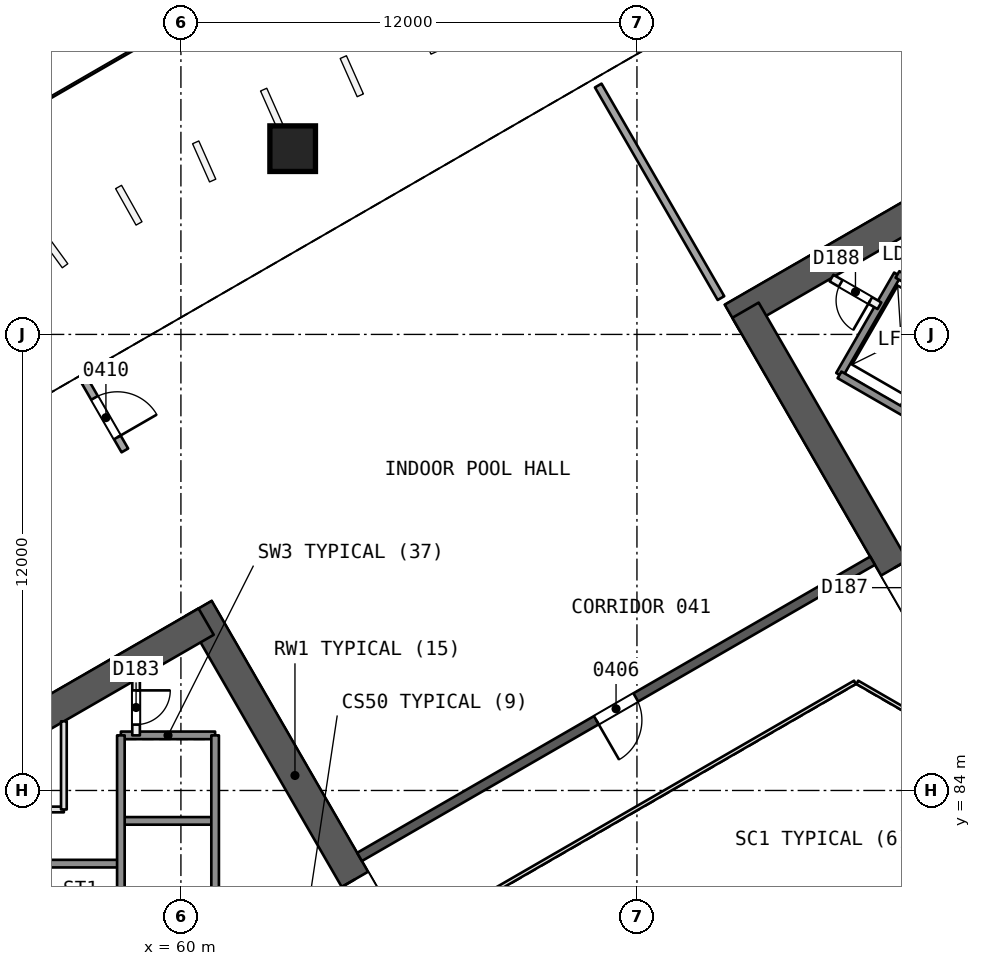
"""IFC4 building model, lengths in metres.
Left out: names, types, materials, properties, quantities, classifications, styles, units other than length and angle.
Written with IfcOpenShell. Run it as: python <this file> out.ifc"""

import sys

from ifc_helpers import new_model, si_unit, direction, frame, frame_2d, origin, origin_2d, place, context, subcontext, project, spatial, rectangle, extrude, element, fill, save


model = new_model("IFC4")
c1 = context("Model", 3, precision=1e-05, world=origin(), true_north=direction((0.0, 1.0)))
c2 = subcontext(c1, "Body", "Model", "MODEL_VIEW")
j1 = project(units=[si_unit("LENGTHUNIT", "METRE"), si_unit("PLANEANGLEUNIT", "RADIAN")], contexts=[c1])
p1 = place(None, origin())
s1 = spatial("IfcSite", under=j1, at=p1, CompositionType="ELEMENT")
p2 = place(p1, origin())
s2 = spatial("IfcBuilding", under=s1, at=p2, CompositionType="ELEMENT")
p3 = place(p2, frame((0.0, 0.0, 25.4)))
s3 = spatial("IfcBuildingStorey", under=s2, at=p3, CompositionType="ELEMENT", Elevation=25.4)
p4 = place(p3, frame((65.538, 80.0, 0.0), z_axis=(0.0, 0.0, 1.0), x_axis=(-0.49999662545, 0.866027352073, 0.0)))
e1 = element("IfcWall", 1, at=p4, inside=s3, PredefinedType="SHEAR", context=c2, shape_type="SweptSolid", body=[
    extrude(rectangle(XDim=10.149, YDim=0.8, at=frame_2d((5.074, 0.0))), origin(), (0.0, 0.0, 1.0), 4.6),
])
p5 = place(p4, frame((0.719, 0.0, 0.0)))
e2 = element("IfcOpeningElement", 2, at=p5, cuts=e1, PredefinedType="OPENING", context=c2, shape_type="SweptSolid", body=[
    extrude(rectangle(XDim=1.2, YDim=2.1, at=frame_2d((0.6, 1.05))), frame((0.0, 0.411, 0.0), z_axis=(0.0, -1.0, 0.0), x_axis=(1.0, 0.0, 0.0)), (0.0, 0.0, 1.0), 0.821),
])
p6 = place(p3, frame((60.664, 88.443, 0.0), z_axis=(0.0, 0.0, 1.0), x_axis=(-0.866029478545, -0.499992942241, 0.0)))
e3 = element("IfcWall", 3, at=p6, inside=s3, PredefinedType="SHEAR", context=c2, shape_type="SweptSolid", body=[
    extrude(rectangle(XDim=13.933, YDim=0.8, at=frame_2d((6.967, 0.0))), origin(), (0.0, 0.0, 1.0), 4.6),
])
p7 = place(p3, frame((86.723, 103.488, 0.0), z_axis=(0.0, 0.0, 1.0), x_axis=(-0.866032504327, -0.499987701298, 0.0)))
e4 = element("IfcWall", 4, at=p7, inside=s3, PredefinedType="SHEAR", context=c2, shape_type="SweptSolid", body=[
    extrude(rectangle(XDim=14.102, YDim=0.8, at=frame_2d((7.051, 0.0))), origin(), (0.0, 0.0, 1.0), 4.6),
])
p8 = place(p3, frame((74.856, 96.637, 0.0), z_axis=(0.0, 0.0, 1.0), x_axis=(0.499993500917, -0.866029155999, 0.0)))
e5 = element("IfcWall", 5, at=p8, inside=s3, PredefinedType="SHEAR", context=c2, shape_type="SweptSolid", body=[
    extrude(rectangle(XDim=9.98, YDim=0.8, at=frame_2d((4.99, 0.0))), origin(), (0.0, 0.0, 1.0), 4.6),
])
p9 = place(p8, frame((7.83, 0.0, 0.0)))
e6 = element("IfcOpeningElement", 6, at=p9, cuts=e5, PredefinedType="OPENING", context=c2, shape_type="SweptSolid", body=[
    extrude(rectangle(XDim=1.2, YDim=2.1, at=frame_2d((0.6, 1.05))), frame((0.0, 0.411, 0.0), z_axis=(0.0, -1.0, 0.0), x_axis=(1.0, 0.0, 0.0)), (0.0, 0.0, 1.0), 0.821),
])
p10 = place(p3, frame((78.2, 90.046, 0.0), z_axis=(0.0, 0.0, 1.0), x_axis=(-0.866026492143, -0.499998114903, 0.0)))
e7 = element("IfcWall", 7, at=p10, inside=s3, PredefinedType="SHEAR", context=c2, shape_type="SweptSolid", body=[
    extrude(rectangle(XDim=15.588, YDim=0.25, at=frame_2d((7.794, 0.0))), origin(), (0.0, 0.0, 1.0), 4.1),
])
p11 = place(p10, frame((7.194, 0.0, 0.0)))
e8 = element("IfcOpeningElement", 8, at=p11, cuts=e7, PredefinedType="OPENING", context=c2, shape_type="SweptSolid", body=[
    extrude(rectangle(XDim=1.2, YDim=2.4, at=frame_2d((0.6, 1.2))), frame((0.0, 0.135, 0.0), z_axis=(0.0, -1.0, 0.0), x_axis=(1.0, 0.0, 0.0)), (0.0, 0.0, 1.0), 0.271),
])
p12 = place(p3, frame((62.928, 100.908, 0.0), z_axis=(0.010134853242, -0.017510479423, 0.999795312982), x_axis=(-0.500826723306, 0.865311077638, 0.020231958379)))
e9 = element("IfcColumn", 9, at=p12, inside=s3, PredefinedType="COLUMN", context=c2, shape_type="SweptSolid", body=[
    extrude(rectangle(XDim=1.2, YDim=1.2, at=origin_2d()), origin(), (0.0, 0.0, 1.0), 4.601),
])
p13 = place(p3, frame((57.481, 94.754, 0.0), z_axis=(0.0, 0.0, 1.0), x_axis=(0.500002690545, -0.866023850392, 0.0)))
e10 = element("IfcWall", 10, at=p13, inside=s3, PredefinedType="PARTITIONING", context=c2, shape_type="SweptSolid", body=[
    extrude(rectangle(XDim=2.086, YDim=0.2, at=frame_2d((1.043, 0.0))), origin(), (0.0, 0.0, 1.0), 4.1),
])
p14 = place(p13, frame((0.49, 0.0, 0.0)))
e11 = element("IfcOpeningElement", 11, at=p14, cuts=e10, PredefinedType="OPENING", context=c2, shape_type="SweptSolid", body=[
    extrude(rectangle(XDim=1.2, YDim=2.4, at=frame_2d((0.6, 1.2))), frame((0.0, 0.11, 0.0), z_axis=(0.0, -1.0, 0.0), x_axis=(1.0, 0.0, 0.0)), (0.0, 0.0, 1.0), 0.221),
])
p15 = place(p3, frame((74.21, 96.956, 0.0), z_axis=(0.0, 0.0, 1.0), x_axis=(-0.500001702147, 0.866024421047, 0.0)))
e12 = element("IfcWall", 12, at=p15, inside=s3, PredefinedType="PARTITIONING", context=c2, shape_type="SweptSolid", body=[
    extrude(rectangle(XDim=6.458, YDim=0.2, at=frame_2d((3.229, 0.0))), origin(), (0.0, 0.0, 1.0), 4.1),
])
p16 = place(p3, frame((60.9, 85.45, 0.0), z_axis=(0.0, 0.0, 1.0), x_axis=(-1.0, 0.0, 0.0)))
e13 = element("IfcWall", 13, at=p16, inside=s3, PredefinedType="SOLIDWALL", context=c2, shape_type="SweptSolid", body=[
    extrude(rectangle(XDim=2.48, YDim=0.2, at=frame_2d((1.24, 0.0))), origin(), (0.0, 0.0, 1.0), 4.1),
])
p17 = place(p3, frame((56.92, 83.5, 0.0), z_axis=(0.0, 0.0, 1.0), x_axis=(-1.0, 0.0, 0.0)))
e14 = element("IfcWall", 14, at=p17, inside=s3, PredefinedType="PARTITIONING", context=c2, shape_type="SweptSolid", body=[
    extrude(rectangle(XDim=4.018, YDim=0.15, at=frame_2d((2.009, 0.0))), origin(), (0.0, 0.0, 1.0), 4.1),
])
p18 = place(p17, frame((1.531, 0.0, 0.0)))
e15 = element("IfcOpeningElement", 15, at=p18, cuts=e14, PredefinedType="OPENING", context=c2, shape_type="SweptSolid", body=[
    extrude(rectangle(XDim=0.9, YDim=2.1, at=frame_2d((0.45, 1.05))), frame((0.0, 0.085, 0.0), z_axis=(0.0, -1.0, 0.0), x_axis=(1.0, 0.0, 0.0)), (0.0, 0.0, 1.0), 0.171),
])
p19 = place(p3, frame((60.9, 83.2, 0.0), z_axis=(0.0, 0.0, 1.0), x_axis=(-1.0, 0.0, 0.0)))
e16 = element("IfcWall", 16, at=p19, inside=s3, PredefinedType="SOLIDWALL", context=c2, shape_type="SweptSolid", body=[
    extrude(rectangle(XDim=2.48, YDim=0.2, at=frame_2d((1.24, 0.0))), origin(), (0.0, 0.0, 1.0), 4.1),
])
p20 = place(p3, frame((58.42, 82.075, 0.0), z_axis=(0.0, 0.0, 1.0), x_axis=(-1.0, 0.0, 0.0)))
e17 = element("IfcWall", 17, at=p20, inside=s3, PredefinedType="SOLIDWALL", context=c2, shape_type="SweptSolid", body=[
    extrude(rectangle(XDim=7.7, YDim=0.2, at=frame_2d((3.85, 0.0))), origin(), (0.0, 0.0, 1.0), 4.1),
])
p21 = place(p3, frame((60.9, 85.45, 0.0), z_axis=(0.0, 0.0, 1.0), x_axis=(0.0, -1.0, 0.0)))
e18 = element("IfcWall", 18, at=p21, inside=s3, PredefinedType="SOLIDWALL", context=c2, shape_type="SweptSolid", body=[
    extrude(rectangle(XDim=10.9, YDim=0.2, at=frame_2d((5.45, 0.0))), origin(), (0.0, 0.0, 1.0), 4.1),
])
p22 = place(p3, frame((58.82, 86.917, 0.0), z_axis=(0.0, 0.0, 1.0), x_axis=(0.0, -1.0, 0.0)))
e19 = element("IfcWall", 19, at=p22, inside=s3, PredefinedType="PARTITIONING", context=c2, shape_type="SweptSolid", body=[
    extrude(rectangle(XDim=1.467, YDim=0.2, at=frame_2d((0.733, 0.0))), origin(), (0.0, 0.0, 1.0), 4.1),
])
p23 = place(p22, frame((0.283, 0.0, 0.0)))
e20 = element("IfcOpeningElement", 20, at=p23, cuts=e19, PredefinedType="OPENING", context=c2, shape_type="SweptSolid", body=[
    extrude(rectangle(XDim=0.9, YDim=2.1, at=frame_2d((0.45, 1.05))), frame((0.0, 0.11, 0.0), z_axis=(0.0, -1.0, 0.0), x_axis=(1.0, 0.0, 0.0)), (0.0, 0.0, 1.0), 0.221),
])
p24 = place(p3, frame((58.42, 85.45, 0.0), z_axis=(0.0, 0.0, 1.0), x_axis=(0.0, -1.0, 0.0)))
e21 = element("IfcWall", 21, at=p24, inside=s3, PredefinedType="SOLIDWALL", context=c2, shape_type="SweptSolid", body=[
    extrude(rectangle(XDim=9.0, YDim=0.2, at=frame_2d((4.5, 0.0))), origin(), (0.0, 0.0, 1.0), 4.1),
])
p25 = place(p3, frame((56.92, 85.82, 0.0), z_axis=(0.0, 0.0, 1.0), x_axis=(0.0, -1.0, 0.0)))
e22 = element("IfcWall", 22, at=p25, inside=s3, PredefinedType="PARTITIONING", context=c2, shape_type="SweptSolid", body=[
    extrude(rectangle(XDim=2.32, YDim=0.15, at=frame_2d((1.16, 0.0))), origin(), (0.0, 0.0, 1.0), 4.1),
])
for number, where, z_axis, x_axis in (
    (23, (78.976, 93.986, 0.0), (0.0, 0.0, 1.0), (0.5, 0.866, 0.0)),
    (24, (77.33, 94.936, 0.0), (0.0, 0.0, 1.0), (0.5, 0.866, 0.0)),
):
    element("IfcWall", number, at=place(p3, frame(where, z_axis=z_axis, x_axis=x_axis)), inside=s3, PredefinedType="SOLIDWALL", context=c2, shape_type="SweptSolid", body=[
        extrude(rectangle(XDim=3.05, YDim=0.2, at=frame_2d((1.525, 0.0))), origin(), (0.0, 0.0, 1.0), 4.1),
    ])
p26 = place(p3, frame((86.77, 89.486, 0.0), z_axis=(0.0, 0.0, 1.0), x_axis=(-0.86601811187, 0.500012629753, 0.0)))
e25 = element("IfcWall", 25, at=p26, inside=s3, PredefinedType="SOLIDWALL", context=c2, shape_type="SweptSolid", body=[
    extrude(rectangle(XDim=10.9, YDim=0.2, at=frame_2d((5.45, 0.0))), origin(), (0.0, 0.0, 1.0), 4.1),
])
p27 = place(p3, frame((78.38, 96.755, 0.0), z_axis=(0.0, 0.0, 1.0), x_axis=(-0.866003949776, 0.500037157592, 0.0)))
e26 = element("IfcWall", 26, at=p27, inside=s3, PredefinedType="PARTITIONING", context=c2, shape_type="SweptSolid", body=[
    extrude(rectangle(XDim=1.455, YDim=0.2, at=frame_2d((0.728, 0.0))), origin(), (0.0, 0.0, 1.0), 4.1),
])
p28 = place(p27, frame((0.278, 0.0, 0.0)))
e27 = element("IfcOpeningElement", 27, at=p28, cuts=e26, PredefinedType="OPENING", context=c2, shape_type="SweptSolid", body=[
    extrude(rectangle(XDim=0.9, YDim=2.1, at=frame_2d((0.45, 1.05))), frame((0.0, 0.11, 0.0), z_axis=(0.0, -1.0, 0.0), x_axis=(1.0, 0.0, 0.0)), (0.0, 0.0, 1.0), 0.221),
])
p29 = place(p3, frame((80.5, 96.627, 0.0), z_axis=(0.0, 0.0, 1.0), x_axis=(-0.86601224135, 0.500022797313, 0.0)))
e28 = element("IfcWall", 28, at=p29, inside=s3, PredefinedType="SOLIDWALL", context=c2, shape_type="SweptSolid", body=[
    extrude(rectangle(XDim=1.9, YDim=0.2, at=frame_2d((0.95, 0.0))), origin(), (0.0, 0.0, 1.0), 4.1),
])
p30 = place(p29, frame((0.4, 0.0, 0.0)))
e29 = element("IfcOpeningElement", 29, at=p30, cuts=e28, PredefinedType="OPENING", context=c2, shape_type="SweptSolid", body=[
    extrude(rectangle(XDim=1.1, YDim=2.1, at=frame_2d((0.55, 1.05))), frame((0.0, 0.11, 0.0), z_axis=(0.0, -1.0, 0.0), x_axis=(1.0, 0.0, 0.0)), (0.0, 0.0, 1.0), 0.221),
])
p31 = place(p3, frame((79.53, 85.846, 0.0), z_axis=(0.0, 0.0, 1.0), x_axis=(-0.866041268327, 0.499972520799, 0.0)))
e30 = element("IfcWall", 30, at=p31, inside=s3, PredefinedType="PARTITIONING", context=c2, shape_type="SweptSolid", body=[
    extrude(rectangle(XDim=2.0, YDim=0.1, at=frame_2d((1.0, 0.0))), origin(), (0.0, 0.0, 1.0), 4.1),
])
p32 = place(p3, frame((77.738, 86.846, 0.0), z_axis=(0.0, 0.0, 1.0), x_axis=(-0.866026658274, -0.499997827154, 0.0)))
e31 = element("IfcWall", 31, at=p32, inside=s3, PredefinedType="PARTITIONING", context=c2, shape_type="SweptSolid", body=[
    extrude(rectangle(XDim=11.588, YDim=0.1, at=frame_2d((5.794, 0.0))), origin(), (0.0, 0.0, 1.0), 4.1),
])
p33 = place(p11, origin())
e32 = element("IfcDoor", 32, at=p33, inside=s3, OperationType="SINGLE_SWING_RIGHT", PredefinedType="NOTDEFINED", context=c2, shape_type="SweptSolid", body=[
    extrude(rectangle(XDim=1.2, YDim=2.4, at=frame_2d((0.6, 1.2))), frame((0.0, 0.025, 0.0), z_axis=(0.0, -1.0, 0.0), x_axis=(1.0, 0.0, 0.0)), (0.0, 0.0, 1.0), 0.05),
])
fill(e8, e32)
p34 = place(p14, origin())
e33 = element("IfcDoor", 33, at=p34, inside=s3, OperationType="SINGLE_SWING_RIGHT", PredefinedType="NOTDEFINED", context=c2, shape_type="SweptSolid", body=[
    extrude(rectangle(XDim=1.2, YDim=2.4, at=frame_2d((0.6, 1.2))), frame((0.0, 0.025, 0.0), z_axis=(0.0, -1.0, 0.0), x_axis=(1.0, 0.0, 0.0)), (0.0, 0.0, 1.0), 0.05),
])
fill(e11, e33)
p35 = place(p5, origin())
e34 = element("IfcDoor", 34, at=p35, inside=s3, OperationType="SINGLE_SWING_RIGHT", PredefinedType="NOTDEFINED", context=c2, shape_type="SweptSolid", body=[
    extrude(rectangle(XDim=1.2, YDim=2.1, at=frame_2d((0.6, 1.05))), frame((0.0, 0.025, 0.0), z_axis=(0.0, -1.0, 0.0), x_axis=(1.0, 0.0, 0.0)), (0.0, 0.0, 1.0), 0.05),
])
fill(e2, e34)
p36 = place(p23, origin())
e35 = element("IfcDoor", 35, at=p36, inside=s3, OperationType="SINGLE_SWING_LEFT", PredefinedType="NOTDEFINED", context=c2, shape_type="SweptSolid", body=[
    extrude(rectangle(XDim=0.9, YDim=2.1, at=frame_2d((0.45, 1.05))), frame((0.0, 0.025, 0.0), z_axis=(0.0, -1.0, 0.0), x_axis=(1.0, 0.0, 0.0)), (0.0, 0.0, 1.0), 0.05),
])
fill(e20, e35)
p37 = place(p9, origin())
e36 = element("IfcDoor", 36, at=p37, inside=s3, OperationType="SINGLE_SWING_LEFT", PredefinedType="NOTDEFINED", context=c2, shape_type="SweptSolid", body=[
    extrude(rectangle(XDim=1.2, YDim=2.1, at=frame_2d((0.6, 1.05))), frame((0.0, 0.025, 0.0), z_axis=(0.0, -1.0, 0.0), x_axis=(1.0, 0.0, 0.0)), (0.0, 0.0, 1.0), 0.05),
])
fill(e6, e36)
p38 = place(p28, origin())
e37 = element("IfcDoor", 37, at=p38, inside=s3, OperationType="SINGLE_SWING_LEFT", PredefinedType="NOTDEFINED", context=c2, shape_type="SweptSolid", body=[
    extrude(rectangle(XDim=0.9, YDim=2.1, at=frame_2d((0.45, 1.05))), frame((0.0, 0.025, 0.0), z_axis=(0.0, -1.0, 0.0), x_axis=(1.0, 0.0, 0.0)), (0.0, 0.0, 1.0), 0.05),
])
fill(e27, e37)
save(model, sys.argv[1])
